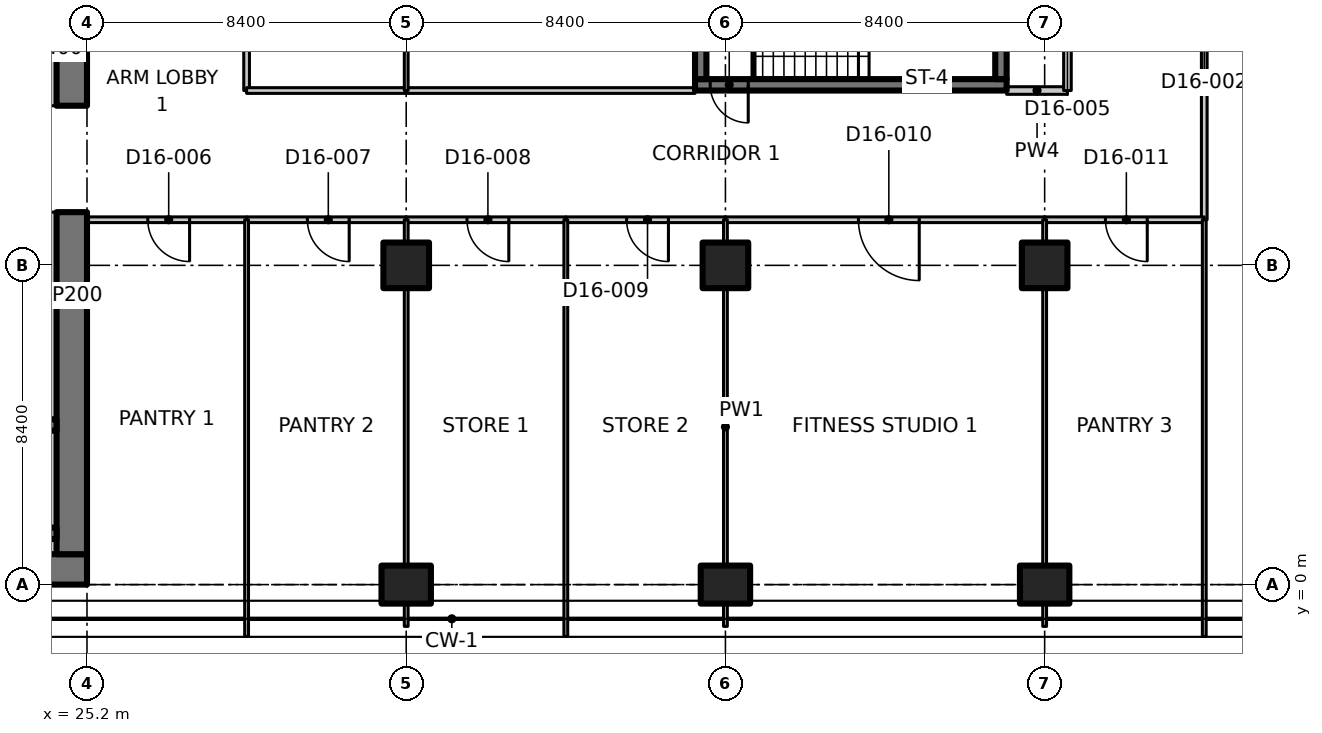
"""IFC4 building model, lengths in metres.
Left out: names, types, materials, properties, quantities, classifications, styles, units other than length and angle.
Written with IfcOpenShell. Run it as: python <this file> out.ifc"""

import sys

from ifc_helpers import new_model, si_unit, direction, frame, frame_2d, origin, origin_2d, place, context, subcontext, project, spatial, polyline, rectangle, outline, extrude, element, fill, save


model = new_model("IFC4")
c1 = context("Model", 3, precision=1e-05, world=origin(), true_north=direction((0.0, 1.0)))
c2 = subcontext(c1, "Body", "Model", "MODEL_VIEW")
j1 = project(units=[si_unit("LENGTHUNIT", "METRE"), si_unit("PLANEANGLEUNIT", "RADIAN")], contexts=[c1])
p1 = place(None, origin())
s1 = spatial("IfcSite", under=j1, at=p1, CompositionType="ELEMENT")
p2 = place(p1, origin())
s2 = spatial("IfcBuilding", under=s1, at=p2, CompositionType="ELEMENT")
p3 = place(p2, frame((0.0, 0.0, 131.3)))
s3 = spatial("IfcBuildingStorey", under=s2, at=p3, CompositionType="ELEMENT", Elevation=131.3)
p4 = place(p3, frame((33.6, 0.0, 0.0), z_axis=(0.0, 0.0, 1.0), x_axis=(0.0, 1.0, 0.0)))
e1 = element("IfcColumn", 1, at=p4, inside=s3, PredefinedType="COLUMN", context=c2, shape_type="SweptSolid", body=[
    extrude(rectangle(XDim=1.0, YDim=1.3, at=origin_2d()), origin(), (0.0, 0.0, 1.0), 3.35),
])
p5 = place(p3, frame((33.6, 8.4, 0.0), z_axis=(0.0, 0.0, 1.0), x_axis=(1.0, 0.0, 0.0)))
e2 = element("IfcColumn", 2, at=p5, inside=s3, PredefinedType="COLUMN", context=c2, shape_type="SweptSolid", body=[
    extrude(rectangle(XDim=1.2, YDim=1.2, at=origin_2d()), origin(), (0.0, 0.0, 1.0), 3.35),
])
p6 = place(p3, frame((42.0, 0.0, 0.0), z_axis=(0.0, 0.0, 1.0), x_axis=(0.0, 1.0, 0.0)))
e3 = element("IfcColumn", 3, at=p6, inside=s3, PredefinedType="COLUMN", context=c2, shape_type="SweptSolid", body=[
    extrude(rectangle(XDim=1.0, YDim=1.3, at=origin_2d()), origin(), (0.0, 0.0, 1.0), 3.35),
])
p7 = place(p3, frame((42.0, 8.4, 0.0), z_axis=(0.0, 0.0, 1.0), x_axis=(1.0, 0.0, 0.0)))
e4 = element("IfcColumn", 4, at=p7, inside=s3, PredefinedType="COLUMN", context=c2, shape_type="SweptSolid", body=[
    extrude(rectangle(XDim=1.2, YDim=1.2, at=origin_2d()), origin(), (0.0, 0.0, 1.0), 3.35),
])
p8 = place(p3, frame((50.4, 0.0, 0.0), z_axis=(0.0, 0.0, 1.0), x_axis=(0.0, 1.0, 0.0)))
e5 = element("IfcColumn", 5, at=p8, inside=s3, PredefinedType="COLUMN", context=c2, shape_type="SweptSolid", body=[
    extrude(rectangle(XDim=1.0, YDim=1.3, at=origin_2d()), origin(), (0.0, 0.0, 1.0), 3.35),
])
p9 = place(p3, frame((50.4, 8.4, 0.0), z_axis=(0.0, 0.0, 1.0), x_axis=(1.0, 0.0, 0.0)))
e6 = element("IfcColumn", 6, at=p9, inside=s3, PredefinedType="COLUMN", context=c2, shape_type="SweptSolid", body=[
    extrude(rectangle(XDim=1.2, YDim=1.2, at=origin_2d()), origin(), (0.0, 0.0, 1.0), 3.35),
])
p10 = place(p3, frame((7.136, 0.4, 0.0), z_axis=(0.0, 0.0, 1.0), x_axis=(1.0, 0.0, 0.0)))
e7 = element("IfcWall", 7, at=p10, inside=s3, PredefinedType="SHEAR", context=c2, shape_type="SweptSolid", body=[
    extrude(rectangle(XDim=18.063, YDim=0.8, at=frame_2d((9.032, 0.0))), origin(), (0.0, 0.0, 1.0), 3.35),
])
p11 = place(p3, frame((24.8, 0.8, 0.0), z_axis=(0.0, 0.0, 1.0), x_axis=(0.0, 1.0, 0.0)))
e8 = element("IfcWall", 8, at=p11, inside=s3, PredefinedType="SHEAR", context=c2, shape_type="SweptSolid", body=[
    extrude(rectangle(XDim=9.0, YDim=0.8, at=frame_2d((4.5, 0.0))), origin(), (0.0, 0.0, 1.0), 3.35),
])
p12 = place(p3, frame((24.8, 12.6, 0.0), z_axis=(0.0, 0.0, 1.0), x_axis=(0.0, 1.0, 0.0)))
e9 = element("IfcWall", 9, at=p12, inside=s3, PredefinedType="SHEAR", context=c2, shape_type="SweptSolid", body=[
    extrude(rectangle(XDim=3.4, YDim=0.8, at=frame_2d((1.7, 0.0))), origin(), (0.0, 0.0, 1.0), 3.35),
])
p13 = place(p3, frame((24.2, 12.6, 0.0), z_axis=(0.0, 0.0, 1.0), x_axis=(0.0, 1.0, 0.0)))
e10 = element("IfcWall", 10, at=p13, inside=s3, PredefinedType="PARTITIONING", context=c2, shape_type="SweptSolid", body=[
    extrude(rectangle(XDim=3.0, YDim=0.4, at=frame_2d((1.5, 0.0))), origin(), (0.0, 0.0, 1.0), 3.35),
])
p14 = place(p3, frame((15.8, 1.35, 0.0), z_axis=(0.0, 0.0, 1.0), x_axis=(1.0, 0.0, 0.0)))
e11 = element("IfcWall", 11, at=p14, inside=s3, PredefinedType="SHEAR", context=c2, shape_type="SweptSolid", body=[
    extrude(rectangle(XDim=8.6, YDim=0.3, at=frame_2d((4.3, 0.0))), origin(), (0.0, 0.0, 1.0), 3.35),
])
p15 = place(p3, frame((15.8, 4.2, 0.0), z_axis=(0.0, 0.0, 1.0), x_axis=(1.0, 0.0, 0.0)))
e12 = element("IfcWall", 12, at=p15, inside=s3, PredefinedType="SHEAR", context=c2, shape_type="SweptSolid", body=[
    extrude(rectangle(XDim=8.6, YDim=0.3, at=frame_2d((4.3, 0.0))), origin(), (0.0, 0.0, 1.0), 3.35),
])
p16 = place(p15, frame((0.4, 0.0, 0.0)))
e13 = element("IfcOpeningElement", 13, at=p16, cuts=e12, PredefinedType="OPENING", context=c2, shape_type="SweptSolid", body=[
    extrude(rectangle(XDim=1.0, YDim=2.1, at=frame_2d((0.5, 1.05))), frame((0.0, 0.16, 0.0), z_axis=(0.0, -1.0, 0.0), x_axis=(1.0, 0.0, 0.0)), (0.0, 0.0, 1.0), 0.32),
])
p17 = place(p3, frame((49.4, 13.15, 0.0), z_axis=(0.0, 0.0, 1.0), x_axis=(-1.0, 0.0, 0.0)))
e14 = element("IfcWall", 14, at=p17, inside=s3, PredefinedType="SHEAR", context=c2, shape_type="SweptSolid", body=[
    extrude(rectangle(XDim=8.2, YDim=0.3, at=frame_2d((4.1, 0.0))), origin(), (0.0, 0.0, 1.0), 3.35),
])
p18 = place(p17, frame((6.8, 0.0, 0.0)))
e15 = element("IfcOpeningElement", 15, at=p18, cuts=e14, PredefinedType="OPENING", context=c2, shape_type="SweptSolid", body=[
    extrude(rectangle(XDim=1.0, YDim=2.1, at=frame_2d((0.5, 1.05))), frame((0.0, 0.16, 0.0), z_axis=(0.0, -1.0, 0.0), x_axis=(1.0, 0.0, 0.0)), (0.0, 0.0, 1.0), 0.32),
])
for number, where, z_axis, x_axis in (
    (16, (41.35, 13.3, 0.0), (0.0, 0.0, 1.0), (0.0, 1.0, 0.0)),
    (17, (49.25, 13.3, 0.0), (0.0, 0.0, 1.0), (0.0, 1.0, 0.0)),
):
    element("IfcWall", number, at=place(p3, frame(where, z_axis=z_axis, x_axis=x_axis)), inside=s3, PredefinedType="SHEAR", context=c2, shape_type="SweptSolid", body=[
        extrude(rectangle(XDim=2.55, YDim=0.3, at=frame_2d((1.275, 0.0))), origin(), (0.0, 0.0, 1.0), 3.35),
    ])
p19 = place(p3, frame((13.35, 1.0, 0.0), z_axis=(0.0, 0.0, 1.0), x_axis=(1.0, 0.0, 0.0)))
e18 = element("IfcWall", 18, at=p19, inside=s3, PredefinedType="PARTITIONING", context=c2, shape_type="SweptSolid", body=[
    extrude(rectangle(XDim=11.05, YDim=0.4, at=frame_2d((5.525, 0.0))), origin(), (0.0, 0.0, 1.0), 3.35),
])
p20 = place(p3, frame((24.2, 1.5, 0.0), z_axis=(0.0, 0.0, 1.0), x_axis=(0.0, 1.0, 0.0)))
e19 = element("IfcWall", 19, at=p20, inside=s3, PredefinedType="PARTITIONING", context=c2, shape_type="SweptSolid", body=[
    extrude(rectangle(XDim=2.55, YDim=0.4, at=frame_2d((1.275, 0.0))), origin(), (0.0, 0.0, 1.0), 3.35),
])
p21 = place(p3, frame((24.2, 4.35, 0.0), z_axis=(0.0, 0.0, 1.0), x_axis=(0.0, 1.0, 0.0)))
e20 = element("IfcWall", 20, at=p21, inside=s3, PredefinedType="PARTITIONING", context=c2, shape_type="SweptSolid", body=[
    extrude(rectangle(XDim=5.45, YDim=0.4, at=frame_2d((2.725, 0.0))), origin(), (0.0, 0.0, 1.0), 3.35),
])
p22 = place(p3, frame((29.4, 17.6, 0.0), z_axis=(0.0, 0.0, 1.0), x_axis=(0.0, -1.0, 0.0)))
e21 = element("IfcWall", 21, at=p22, inside=s3, PredefinedType="PARTITIONING", context=c2, shape_type="SweptSolid", body=[
    extrude(rectangle(XDim=4.6, YDim=0.15, at=frame_2d((2.3, 0.0))), origin(), (0.0, 0.0, 1.0), 3.33),
])
p23 = place(p22, frame((1.8, 0.0, 0.0)))
e22 = element("IfcOpeningElement", 22, at=p23, cuts=e21, PredefinedType="OPENING", context=c2, shape_type="SweptSolid", body=[
    extrude(rectangle(XDim=1.0, YDim=2.1, at=frame_2d((0.5, 1.05))), frame((0.0, 0.085, 0.0), z_axis=(0.0, -1.0, 0.0), x_axis=(1.0, 0.0, 0.0)), (0.0, 0.0, 1.0), 0.17),
])
p24 = place(p3, frame((29.4, 9.6, 0.0), z_axis=(0.0, 0.0, 1.0), x_axis=(-1.0, 0.0, 0.0)))
e23 = element("IfcWall", 23, at=p24, inside=s3, PredefinedType="PARTITIONING", context=c2, shape_type="SweptSolid", body=[
    extrude(rectangle(XDim=4.2, YDim=0.15, at=frame_2d((2.1, 0.0))), origin(), (0.0, 0.0, 1.0), 3.33),
])
p25 = place(p24, frame((1.5, 0.0, 0.0)))
e24 = element("IfcOpeningElement", 24, at=p25, cuts=e23, PredefinedType="OPENING", context=c2, shape_type="SweptSolid", body=[
    extrude(rectangle(XDim=1.1, YDim=2.1, at=frame_2d((0.55, 1.05))), frame((0.0, 0.085, 0.0), z_axis=(0.0, -1.0, 0.0), x_axis=(1.0, 0.0, 0.0)), (0.0, 0.0, 1.0), 0.17),
])
p26 = place(p3, frame((54.6, 13.0, 0.0), z_axis=(0.0, 0.0, 1.0), x_axis=(0.0, -1.0, 0.0)))
e25 = element("IfcWall", 25, at=p26, inside=s3, PredefinedType="PARTITIONING", context=c2, shape_type="SweptSolid", body=[
    extrude(rectangle(XDim=3.4, YDim=0.15, at=frame_2d((1.7, 0.0))), origin(), (0.0, 0.0, 1.0), 3.33),
])
p27 = place(p3, frame((29.4, 13.0, 0.0), z_axis=(0.0, 0.0, 1.0), x_axis=(1.0, 0.0, 0.0)))
e26 = element("IfcWall", 26, at=p27, inside=s3, PredefinedType="PARTITIONING", context=c2, shape_type="SweptSolid", body=[
    extrude(rectangle(XDim=4.2, YDim=0.15, at=frame_2d((2.1, 0.0))), origin(), (0.0, 0.0, 1.0), 3.33),
])
p28 = place(p3, frame((33.6, 13.0, 0.0), z_axis=(0.0, 0.0, 1.0), x_axis=(1.0, 0.0, 0.0)))
e27 = element("IfcWall", 27, at=p28, inside=s3, PredefinedType="PARTITIONING", context=c2, shape_type="SweptSolid", body=[
    extrude(rectangle(XDim=7.6, YDim=0.15, at=frame_2d((3.8, 0.0))), origin(), (0.0, 0.0, 1.0), 3.33),
])
p29 = place(p3, frame((49.4, 13.0, 0.0), z_axis=(0.0, 0.0, 1.0), x_axis=(1.0, 0.0, 0.0)))
e28 = element("IfcWall", 28, at=p29, inside=s3, PredefinedType="PARTITIONING", context=c2, shape_type="SweptSolid", body=[
    extrude(rectangle(XDim=1.6, YDim=0.2, at=frame_2d((0.8, 0.0))), origin(), (0.0, 0.0, 1.0), 3.33),
])
p30 = place(p3, frame((33.6, 9.6, 0.0), z_axis=(0.0, 0.0, 1.0), x_axis=(-1.0, 0.0, 0.0)))
e29 = element("IfcWall", 29, at=p30, inside=s3, PredefinedType="PARTITIONING", context=c2, shape_type="SweptSolid", body=[
    extrude(rectangle(XDim=4.2, YDim=0.15, at=frame_2d((2.1, 0.0))), origin(), (0.0, 0.0, 1.0), 3.33),
])
p31 = place(p30, frame((1.5, 0.0, 0.0)))
e30 = element("IfcOpeningElement", 30, at=p31, cuts=e29, PredefinedType="OPENING", context=c2, shape_type="SweptSolid", body=[
    extrude(rectangle(XDim=1.1, YDim=2.1, at=frame_2d((0.55, 1.05))), frame((0.0, 0.085, 0.0), z_axis=(0.0, -1.0, 0.0), x_axis=(1.0, 0.0, 0.0)), (0.0, 0.0, 1.0), 0.17),
])
p32 = place(p3, frame((37.8, 9.6, 0.0), z_axis=(0.0, 0.0, 1.0), x_axis=(-1.0, 0.0, 0.0)))
e31 = element("IfcWall", 31, at=p32, inside=s3, PredefinedType="PARTITIONING", context=c2, shape_type="SweptSolid", body=[
    extrude(rectangle(XDim=4.2, YDim=0.15, at=frame_2d((2.1, 0.0))), origin(), (0.0, 0.0, 1.0), 3.33),
])
p33 = place(p32, frame((1.5, 0.0, 0.0)))
e32 = element("IfcOpeningElement", 32, at=p33, cuts=e31, PredefinedType="OPENING", context=c2, shape_type="SweptSolid", body=[
    extrude(rectangle(XDim=1.1, YDim=2.1, at=frame_2d((0.55, 1.05))), frame((0.0, 0.085, 0.0), z_axis=(0.0, -1.0, 0.0), x_axis=(1.0, 0.0, 0.0)), (0.0, 0.0, 1.0), 0.17),
])
p34 = place(p3, frame((42.0, 9.6, 0.0), z_axis=(0.0, 0.0, 1.0), x_axis=(-1.0, 0.0, 0.0)))
e33 = element("IfcWall", 33, at=p34, inside=s3, PredefinedType="PARTITIONING", context=c2, shape_type="SweptSolid", body=[
    extrude(rectangle(XDim=4.2, YDim=0.15, at=frame_2d((2.1, 0.0))), origin(), (0.0, 0.0, 1.0), 3.33),
])
p35 = place(p34, frame((1.5, 0.0, 0.0)))
e34 = element("IfcOpeningElement", 34, at=p35, cuts=e33, PredefinedType="OPENING", context=c2, shape_type="SweptSolid", body=[
    extrude(rectangle(XDim=1.1, YDim=2.1, at=frame_2d((0.55, 1.05))), frame((0.0, 0.085, 0.0), z_axis=(0.0, -1.0, 0.0), x_axis=(1.0, 0.0, 0.0)), (0.0, 0.0, 1.0), 0.17),
])
p36 = place(p3, frame((50.4, 9.6, 0.0), z_axis=(0.0, 0.0, 1.0), x_axis=(-1.0, 0.0, 0.0)))
e35 = element("IfcWall", 35, at=p36, inside=s3, PredefinedType="PARTITIONING", context=c2, shape_type="SweptSolid", body=[
    extrude(rectangle(XDim=8.4, YDim=0.15, at=frame_2d((4.2, 0.0))), origin(), (0.0, 0.0, 1.0), 3.33),
])
p37 = place(p36, frame((3.3, 0.0, 0.0)))
e36 = element("IfcOpeningElement", 36, at=p37, cuts=e35, PredefinedType="OPENING", context=c2, shape_type="SweptSolid", body=[
    extrude(rectangle(XDim=1.6, YDim=2.1, at=frame_2d((0.8, 1.05))), frame((0.0, 0.085, 0.0), z_axis=(0.0, -1.0, 0.0), x_axis=(1.0, 0.0, 0.0)), (0.0, 0.0, 1.0), 0.17),
])
p38 = place(p3, frame((54.6, 9.6, 0.0), z_axis=(0.0, 0.0, 1.0), x_axis=(-1.0, 0.0, 0.0)))
e37 = element("IfcWall", 37, at=p38, inside=s3, PredefinedType="PARTITIONING", context=c2, shape_type="SweptSolid", body=[
    extrude(rectangle(XDim=4.2, YDim=0.15, at=frame_2d((2.1, 0.0))), origin(), (0.0, 0.0, 1.0), 3.33),
])
p39 = place(p38, frame((1.5, 0.0, 0.0)))
e38 = element("IfcOpeningElement", 38, at=p39, cuts=e37, PredefinedType="OPENING", context=c2, shape_type="SweptSolid", body=[
    extrude(rectangle(XDim=1.1, YDim=2.1, at=frame_2d((0.55, 1.05))), frame((0.0, 0.085, 0.0), z_axis=(0.0, -1.0, 0.0), x_axis=(1.0, 0.0, 0.0)), (0.0, 0.0, 1.0), 0.17),
])
p40 = place(p3, frame((54.6, 21.2, 0.0), z_axis=(0.0, 0.0, 1.0), x_axis=(0.0, -1.0, 0.0)))
e39 = element("IfcWall", 39, at=p40, inside=s3, PredefinedType="PARTITIONING", context=c2, shape_type="SweptSolid", body=[
    extrude(rectangle(XDim=8.2, YDim=0.15, at=frame_2d((4.1, 0.0))), origin(), (0.0, 0.0, 1.0), 3.33),
])
p41 = place(p40, frame((3.2, 0.0, 0.0)))
e40 = element("IfcOpeningElement", 40, at=p41, cuts=e39, PredefinedType="OPENING", context=c2, shape_type="SweptSolid", body=[
    extrude(rectangle(XDim=2.0, YDim=2.4, at=frame_2d((1.0, 1.2))), frame((0.0, 0.085, 0.0), z_axis=(0.0, -1.0, 0.0), x_axis=(1.0, 0.0, 0.0)), (0.0, 0.0, 1.0), 0.17),
])
p42 = place(p3, frame((54.6, -1.365, 0.0), z_axis=(0.0, 0.0, 1.0), x_axis=(0.0, 1.0, 0.0)))
e41 = element("IfcWall", 41, at=p42, inside=s3, PredefinedType="PARTITIONING", context=c2, shape_type="SweptSolid", body=[
    extrude(outline(polyline([(0.0, 0.0), (10.965, 0.0), (10.965, 3.33), (1.815, 3.33), (1.813, 2.98), (0.917, 2.98), (0.915, 3.33), (0.265, 3.33), (0.0, 3.33), (0.0, 0.0)])), frame((0.0, 0.05, 0.0), z_axis=(0.0, -1.0, 0.0), x_axis=(1.0, 0.0, 0.0)), (0.0, 0.0, 1.0), 0.1),
])
p43 = place(p3, frame((51.0, 13.0, 0.0), z_axis=(0.0, 0.0, 1.0), x_axis=(0.0, 1.0, 0.0)))
e42 = element("IfcWall", 42, at=p43, inside=s3, PredefinedType="PARTITIONING", context=c2, shape_type="SweptSolid", body=[
    extrude(rectangle(XDim=3.18, YDim=0.2, at=frame_2d((1.59, 0.0))), origin(), (0.0, 0.0, 1.0), 3.33),
])
p44 = place(p43, frame((1.2, 0.0, 0.0)))
e43 = element("IfcOpeningElement", 43, at=p44, cuts=e42, PredefinedType="OPENING", context=c2, shape_type="SweptSolid", body=[
    extrude(rectangle(XDim=1.0, YDim=2.1, at=frame_2d((0.5, 1.05))), frame((0.0, 0.11, 0.0), z_axis=(0.0, -1.0, 0.0), x_axis=(1.0, 0.0, 0.0)), (0.0, 0.0, 1.0), 0.22),
])
p45 = place(p3, frame((33.6, 16.18, 0.0), z_axis=(0.0, 0.0, 1.0), x_axis=(0.0, -1.0, 0.0)))
e44 = element("IfcWall", 44, at=p45, inside=s3, PredefinedType="PARTITIONING", context=c2, shape_type="SweptSolid", body=[
    extrude(rectangle(XDim=3.18, YDim=0.1, at=frame_2d((1.59, 0.0))), origin(), (0.0, 0.0, 1.0), 3.33),
])
p46 = place(p3, frame((29.4, 9.6, 0.0), z_axis=(0.0, 0.0, 1.0), x_axis=(0.0, -1.0, 0.0)))
e45 = element("IfcWall", 45, at=p46, inside=s3, PredefinedType="PARTITIONING", context=c2, shape_type="SweptSolid", body=[
    extrude(outline(polyline([(0.0, 0.0), (10.965, 0.0), (10.965, 3.33), (10.7, 3.33), (10.05, 3.33), (10.048, 2.98), (9.152, 2.98), (9.15, 3.33), (0.0, 3.33), (0.0, 0.0)])), frame((0.0, 0.05, 0.0), z_axis=(0.0, -1.0, 0.0), x_axis=(1.0, 0.0, 0.0)), (0.0, 0.0, 1.0), 0.1),
])
p47 = place(p3, frame((33.6, 9.6, 0.0), z_axis=(0.0, 0.0, 1.0), x_axis=(0.0, -1.0, 0.0)))
e46 = element("IfcWall", 46, at=p47, inside=s3, PredefinedType="PARTITIONING", context=c2, shape_type="SweptSolid", body=[
    extrude(rectangle(XDim=0.58, YDim=0.1, at=frame_2d((0.29, 0.0))), origin(), (0.0, 0.0, 1.0), 3.33),
])
p48 = place(p3, frame((33.6, 7.78, 0.0), z_axis=(0.0, 0.0, 1.0), x_axis=(0.0, -1.0, 0.0)))
e47 = element("IfcWall", 47, at=p48, inside=s3, PredefinedType="PARTITIONING", context=c2, shape_type="SweptSolid", body=[
    extrude(rectangle(XDim=7.26, YDim=0.1, at=frame_2d((3.63, 0.0))), origin(), (0.0, 0.0, 1.0), 3.33),
])
p49 = place(p3, frame((33.6, -0.52, 0.0), z_axis=(0.0, 0.0, 1.0), x_axis=(0.0, -1.0, 0.0)))
e48 = element("IfcWall", 48, at=p49, inside=s3, PredefinedType="PARTITIONING", context=c2, shape_type="SweptSolid", body=[
    extrude(rectangle(XDim=0.58, YDim=0.1, at=frame_2d((0.29, 0.0))), origin(), (0.0, 0.0, 1.0), 3.33),
])
p50 = place(p3, frame((37.8, 9.6, 0.0), z_axis=(0.0, 0.0, 1.0), x_axis=(0.0, -1.0, 0.0)))
e49 = element("IfcWall", 49, at=p50, inside=s3, PredefinedType="PARTITIONING", context=c2, shape_type="SweptSolid", body=[
    extrude(outline(polyline([(0.0, 0.0), (10.965, 0.0), (10.965, 3.33), (10.7, 3.33), (10.05, 3.33), (10.048, 2.98), (9.152, 2.98), (9.15, 3.33), (0.0, 3.33), (0.0, 0.0)])), frame((0.0, 0.05, 0.0), z_axis=(0.0, -1.0, 0.0), x_axis=(1.0, 0.0, 0.0)), (0.0, 0.0, 1.0), 0.1),
])
p51 = place(p3, frame((42.0, 9.6, 0.0), z_axis=(0.0, 0.0, 1.0), x_axis=(0.0, -1.0, 0.0)))
e50 = element("IfcWall", 50, at=p51, inside=s3, PredefinedType="PARTITIONING", context=c2, shape_type="SweptSolid", body=[
    extrude(rectangle(XDim=0.58, YDim=0.1, at=frame_2d((0.29, 0.0))), origin(), (0.0, 0.0, 1.0), 3.33),
])
p52 = place(p3, frame((42.0, 7.78, 0.0), z_axis=(0.0, 0.0, 1.0), x_axis=(0.0, -1.0, 0.0)))
e51 = element("IfcWall", 51, at=p52, inside=s3, PredefinedType="PARTITIONING", context=c2, shape_type="SweptSolid", body=[
    extrude(rectangle(XDim=7.26, YDim=0.1, at=frame_2d((3.63, 0.0))), origin(), (0.0, 0.0, 1.0), 3.33),
])
for number, where, z_axis, x_axis in (
    (52, (42.0, -0.52, 0.0), (0.0, 0.0, 1.0), (0.0, -1.0, 0.0)),
    (53, (50.4, 9.6, 0.0), (0.0, 0.0, 1.0), (0.0, -1.0, 0.0)),
):
    element("IfcWall", number, at=place(p3, frame(where, z_axis=z_axis, x_axis=x_axis)), inside=s3, PredefinedType="PARTITIONING", context=c2, shape_type="SweptSolid", body=[
        extrude(rectangle(XDim=0.58, YDim=0.1, at=frame_2d((0.29, 0.0))), origin(), (0.0, 0.0, 1.0), 3.33),
    ])
p53 = place(p3, frame((50.4, 7.78, 0.0), z_axis=(0.0, 0.0, 1.0), x_axis=(0.0, -1.0, 0.0)))
e54 = element("IfcWall", 54, at=p53, inside=s3, PredefinedType="PARTITIONING", context=c2, shape_type="SweptSolid", body=[
    extrude(rectangle(XDim=7.26, YDim=0.1, at=frame_2d((3.63, 0.0))), origin(), (0.0, 0.0, 1.0), 3.33),
])
p54 = place(p3, frame((50.4, -0.52, 0.0), z_axis=(0.0, 0.0, 1.0), x_axis=(0.0, -1.0, 0.0)))
e55 = element("IfcWall", 55, at=p54, inside=s3, PredefinedType="PARTITIONING", context=c2, shape_type="SweptSolid", body=[
    extrude(rectangle(XDim=0.58, YDim=0.1, at=frame_2d((0.29, 0.0))), origin(), (0.0, 0.0, 1.0), 3.33),
])
p55 = place(p18, origin())
e56 = element("IfcDoor", 56, at=p55, inside=s3, OperationType="SINGLE_SWING_RIGHT", PredefinedType="DOOR", context=c2, shape_type="SweptSolid", body=[
    extrude(rectangle(XDim=1.0, YDim=2.1, at=frame_2d((0.5, 1.05))), frame((0.0, 0.025, 0.0), z_axis=(0.0, -1.0, 0.0), x_axis=(1.0, 0.0, 0.0)), (0.0, 0.0, 1.0), 0.05),
])
fill(e15, e56)
p56 = place(p25, origin())
e57 = element("IfcDoor", 57, at=p56, inside=s3, OperationType="SINGLE_SWING_LEFT", PredefinedType="DOOR", context=c2, shape_type="SweptSolid", body=[
    extrude(rectangle(XDim=1.1, YDim=2.1, at=frame_2d((0.55, 1.05))), frame((0.0, 0.025, 0.0), z_axis=(0.0, -1.0, 0.0), x_axis=(1.0, 0.0, 0.0)), (0.0, 0.0, 1.0), 0.05),
])
fill(e24, e57)
p57 = place(p31, origin())
e58 = element("IfcDoor", 58, at=p57, inside=s3, OperationType="SINGLE_SWING_LEFT", PredefinedType="DOOR", context=c2, shape_type="SweptSolid", body=[
    extrude(rectangle(XDim=1.1, YDim=2.1, at=frame_2d((0.55, 1.05))), frame((0.0, 0.025, 0.0), z_axis=(0.0, -1.0, 0.0), x_axis=(1.0, 0.0, 0.0)), (0.0, 0.0, 1.0), 0.05),
])
fill(e30, e58)
p58 = place(p33, origin())
e59 = element("IfcDoor", 59, at=p58, inside=s3, OperationType="SINGLE_SWING_LEFT", PredefinedType="DOOR", context=c2, shape_type="SweptSolid", body=[
    extrude(rectangle(XDim=1.1, YDim=2.1, at=frame_2d((0.55, 1.05))), frame((0.0, 0.025, 0.0), z_axis=(0.0, -1.0, 0.0), x_axis=(1.0, 0.0, 0.0)), (0.0, 0.0, 1.0), 0.05),
])
fill(e32, e59)
p59 = place(p35, origin())
e60 = element("IfcDoor", 60, at=p59, inside=s3, OperationType="SINGLE_SWING_LEFT", PredefinedType="DOOR", context=c2, shape_type="SweptSolid", body=[
    extrude(rectangle(XDim=1.1, YDim=2.1, at=frame_2d((0.55, 1.05))), frame((0.0, 0.025, 0.0), z_axis=(0.0, -1.0, 0.0), x_axis=(1.0, 0.0, 0.0)), (0.0, 0.0, 1.0), 0.05),
])
fill(e34, e60)
p60 = place(p37, origin())
e61 = element("IfcDoor", 61, at=p60, inside=s3, OperationType="DOUBLE_DOOR_SINGLE_SWING", PredefinedType="DOOR", context=c2, shape_type="SweptSolid", body=[
    extrude(rectangle(XDim=1.6, YDim=2.1, at=frame_2d((0.8, 1.05))), frame((0.0, 0.025, 0.0), z_axis=(0.0, -1.0, 0.0), x_axis=(1.0, 0.0, 0.0)), (0.0, 0.0, 1.0), 0.05),
])
fill(e36, e61)
p61 = place(p39, origin())
e62 = element("IfcDoor", 62, at=p61, inside=s3, OperationType="SINGLE_SWING_LEFT", PredefinedType="DOOR", context=c2, shape_type="SweptSolid", body=[
    extrude(rectangle(XDim=1.1, YDim=2.1, at=frame_2d((0.55, 1.05))), frame((0.0, 0.025, 0.0), z_axis=(0.0, -1.0, 0.0), x_axis=(1.0, 0.0, 0.0)), (0.0, 0.0, 1.0), 0.05),
])
fill(e38, e62)
save(model, sys.argv[1])
